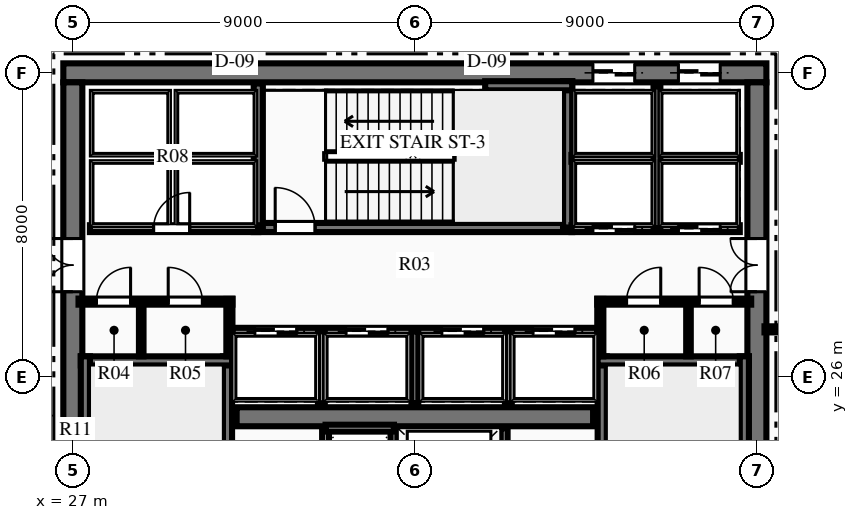
"""IFC4 building model, lengths in metres.
Left out: names, types, materials, properties, quantities, classifications, styles, units other than length and angle.
Written with IfcOpenShell. Run it as: python <this file> out.ifc"""

import sys

from ifc_helpers import new_model, si_unit, direction, frame, frame_2d, origin, place, context, subcontext, project, spatial, rectangle, extrude, element, fill, save


model = new_model("IFC4")
c1 = context("Model", 3, precision=1e-05, world=origin(), true_north=direction((0.0, 1.0)))
c2 = subcontext(c1, "Body", "Model", "MODEL_VIEW")
j1 = project(units=[si_unit("LENGTHUNIT", "METRE"), si_unit("PLANEANGLEUNIT", "RADIAN")], contexts=[c1])
p1 = place(None, origin())
s1 = spatial("IfcSite", under=j1, at=p1, CompositionType="ELEMENT")
p2 = place(p1, origin())
s2 = spatial("IfcBuilding", under=s1, at=p2, CompositionType="ELEMENT")
p3 = place(p2, frame((0.0, 0.0, 136.2)))
s3 = spatial("IfcBuildingStorey", under=s2, at=p3, CompositionType="ELEMENT", Elevation=136.2)
p4 = place(p3, frame((26.75, 34.0, 0.0), z_axis=(0.0, 0.0, 1.0), x_axis=(1.0, 0.0, 0.0)))
e1 = element("IfcWall", 1, at=p4, inside=s3, PredefinedType="SHEAR", context=c2, shape_type="SweptSolid", body=[
    extrude(rectangle(XDim=18.5, YDim=0.5, at=frame_2d((9.25, 0.0))), origin(), (0.0, 0.0, 1.0), 4.5),
])
p5 = place(p4, frame((13.935, 0.0, 0.0)))
e2 = element("IfcOpeningElement", 2, at=p5, cuts=e1, PredefinedType="OPENING", context=c2, shape_type="SweptSolid", body=[
    extrude(rectangle(XDim=1.1, YDim=2.15, at=frame_2d((0.55, 1.075))), frame((0.0, 0.26, 0.0), z_axis=(0.0, -1.0, 0.0), x_axis=(1.0, 0.0, 0.0)), (0.0, 0.0, 1.0), 0.52),
])
p6 = place(p4, frame((16.185, 0.0, 0.0)))
e3 = element("IfcOpeningElement", 3, at=p6, cuts=e1, PredefinedType="OPENING", context=c2, shape_type="SweptSolid", body=[
    extrude(rectangle(XDim=1.1, YDim=2.15, at=frame_2d((0.55, 1.075))), frame((0.0, 0.26, 0.0), z_axis=(0.0, -1.0, 0.0), x_axis=(1.0, 0.0, 0.0)), (0.0, 0.0, 1.0), 0.52),
])
p7 = place(p3, frame((27.0, 18.25, 0.0), z_axis=(0.0, 0.0, 1.0), x_axis=(0.0, 1.0, 0.0)))
e4 = element("IfcWall", 4, at=p7, inside=s3, PredefinedType="SHEAR", context=c2, shape_type="SweptSolid", body=[
    extrude(rectangle(XDim=15.5, YDim=0.5, at=frame_2d((7.75, 0.0))), origin(), (0.0, 0.0, 1.0), 4.5),
])
p8 = place(p7, frame((9.99, 0.0, 0.0)))
e5 = element("IfcOpeningElement", 5, at=p8, cuts=e4, PredefinedType="OPENING", context=c2, shape_type="SweptSolid", body=[
    extrude(rectangle(XDim=1.4, YDim=2.2, at=frame_2d((0.7, 1.1))), frame((0.0, 0.26, 0.0), z_axis=(0.0, -1.0, 0.0), x_axis=(1.0, 0.0, 0.0)), (0.0, 0.0, 1.0), 0.52),
])
p9 = place(p3, frame((45.0, 18.25, 0.0), z_axis=(0.0, 0.0, 1.0), x_axis=(0.0, 1.0, 0.0)))
e6 = element("IfcWall", 6, at=p9, inside=s3, PredefinedType="SHEAR", context=c2, shape_type="SweptSolid", body=[
    extrude(rectangle(XDim=15.5, YDim=0.5, at=frame_2d((7.75, 0.0))), origin(), (0.0, 0.0, 1.0), 4.5),
])
p10 = place(p9, frame((9.99, 0.0, 0.0)))
e7 = element("IfcOpeningElement", 7, at=p10, cuts=e6, PredefinedType="OPENING", context=c2, shape_type="SweptSolid", body=[
    extrude(rectangle(XDim=1.4, YDim=2.2, at=frame_2d((0.7, 1.1))), frame((0.0, 0.26, 0.0), z_axis=(0.0, -1.0, 0.0), x_axis=(1.0, 0.0, 0.0)), (0.0, 0.0, 1.0), 0.52),
])
p11 = place(p3, frame((31.31, 24.95, 0.0), z_axis=(0.0, 0.0, 1.0), x_axis=(1.0, 0.0, 0.0)))
e8 = element("IfcWall", 8, at=p11, inside=s3, PredefinedType="SHEAR", context=c2, shape_type="SweptSolid", body=[
    extrude(rectangle(XDim=9.38, YDim=0.5, at=frame_2d((4.69, 0.0))), origin(), (0.0, 0.0, 1.0), 4.5),
])
p12 = place(p3, frame((31.07, 18.28, 0.0), z_axis=(0.0, 0.0, 1.0), x_axis=(0.0, 1.0, 0.0)))
e9 = element("IfcWall", 9, at=p12, inside=s3, PredefinedType="SHEAR", context=c2, shape_type="SweptSolid", body=[
    extrude(rectangle(XDim=8.26, YDim=0.24, at=frame_2d((4.13, 0.0))), origin(), (0.0, 0.0, 1.0), 4.5),
])
p13 = place(p12, frame((0.365, 0.0, 0.0)))
e10 = element("IfcOpeningElement", 10, at=p13, cuts=e9, PredefinedType="OPENING", context=c2, shape_type="SweptSolid", body=[
    extrude(rectangle(XDim=1.05, YDim=2.15, at=frame_2d((0.525, 1.075))), frame((0.0, 0.13, 0.0), z_axis=(0.0, -1.0, 0.0), x_axis=(1.0, 0.0, 0.0)), (0.0, 0.0, 1.0), 0.26),
])
p14 = place(p3, frame((27.21, 26.42, 0.0), z_axis=(0.0, 0.0, 1.0), x_axis=(1.0, 0.0, 0.0)))
e11 = element("IfcWall", 11, at=p14, inside=s3, PredefinedType="SHEAR", context=c2, shape_type="SweptSolid", body=[
    extrude(rectangle(XDim=3.98, YDim=0.24, at=frame_2d((1.99, 0.0))), origin(), (0.0, 0.0, 1.0), 4.5),
])
p15 = place(p3, frame((27.33, 18.28, 0.0), z_axis=(0.0, 0.0, 1.0), x_axis=(0.0, 1.0, 0.0)))
e12 = element("IfcWall", 12, at=p15, inside=s3, PredefinedType="SHEAR", context=c2, shape_type="SweptSolid", body=[
    extrude(rectangle(XDim=8.26, YDim=0.24, at=frame_2d((4.13, 0.0))), origin(), (0.0, 0.0, 1.0), 4.5),
])
p16 = place(p3, frame((40.93, 18.28, 0.0), z_axis=(0.0, 0.0, 1.0), x_axis=(0.0, 1.0, 0.0)))
e13 = element("IfcWall", 13, at=p16, inside=s3, PredefinedType="SHEAR", context=c2, shape_type="SweptSolid", body=[
    extrude(rectangle(XDim=8.26, YDim=0.24, at=frame_2d((4.13, 0.0))), origin(), (0.0, 0.0, 1.0), 4.5),
])
p17 = place(p16, frame((0.365, 0.0, 0.0)))
e14 = element("IfcOpeningElement", 14, at=p17, cuts=e13, PredefinedType="OPENING", context=c2, shape_type="SweptSolid", body=[
    extrude(rectangle(XDim=1.05, YDim=2.15, at=frame_2d((0.525, 1.075))), frame((0.0, 0.13, 0.0), z_axis=(0.0, -1.0, 0.0), x_axis=(1.0, 0.0, 0.0)), (0.0, 0.0, 1.0), 0.26),
])
p18 = place(p3, frame((40.81, 26.42, 0.0), z_axis=(0.0, 0.0, 1.0), x_axis=(1.0, 0.0, 0.0)))
e15 = element("IfcWall", 15, at=p18, inside=s3, PredefinedType="SHEAR", context=c2, shape_type="SweptSolid", body=[
    extrude(rectangle(XDim=3.98, YDim=0.24, at=frame_2d((1.99, 0.0))), origin(), (0.0, 0.0, 1.0), 4.5),
])
p19 = place(p3, frame((44.67, 18.28, 0.0), z_axis=(0.0, 0.0, 1.0), x_axis=(0.0, 1.0, 0.0)))
e16 = element("IfcWall", 16, at=p19, inside=s3, PredefinedType="SHEAR", context=c2, shape_type="SweptSolid", body=[
    extrude(rectangle(XDim=8.26, YDim=0.24, at=frame_2d((4.13, 0.0))), origin(), (0.0, 0.0, 1.0), 4.5),
])
p20 = place(p3, frame((31.76, 29.93, 0.0), z_axis=(0.0, 0.0, 1.0), x_axis=(1.0, 0.0, 0.0)))
e17 = element("IfcWall", 17, at=p20, inside=s3, PredefinedType="SHEAR", context=c2, shape_type="SweptSolid", body=[
    extrude(rectangle(XDim=8.38, YDim=0.24, at=frame_2d((4.19, 0.0))), origin(), (0.0, 0.0, 1.0), 4.5),
])
p21 = place(p20, frame((0.565, 0.0, 0.0)))
e18 = element("IfcOpeningElement", 18, at=p21, cuts=e17, PredefinedType="OPENING", context=c2, shape_type="SweptSolid", body=[
    extrude(rectangle(XDim=1.05, YDim=2.15, at=frame_2d((0.525, 1.075))), frame((0.0, 0.13, 0.0), z_axis=(0.0, -1.0, 0.0), x_axis=(1.0, 0.0, 0.0)), (0.0, 0.0, 1.0), 0.26),
])
p22 = place(p3, frame((31.88, 29.93, 0.0), z_axis=(0.0, 0.0, 1.0), x_axis=(0.0, 1.0, 0.0)))
e19 = element("IfcWall", 19, at=p22, inside=s3, PredefinedType="SHEAR", context=c2, shape_type="SweptSolid", body=[
    extrude(rectangle(XDim=3.79, YDim=0.24, at=frame_2d((1.895, 0.0))), origin(), (0.0, 0.0, 1.0), 4.5),
])
p23 = place(p3, frame((40.02, 29.93, 0.0), z_axis=(0.0, 0.0, 1.0), x_axis=(0.0, 1.0, 0.0)))
e20 = element("IfcWall", 20, at=p23, inside=s3, PredefinedType="SHEAR", context=c2, shape_type="SweptSolid", body=[
    extrude(rectangle(XDim=3.85, YDim=0.24, at=frame_2d((1.925, 0.0))), origin(), (0.0, 0.0, 1.0), 4.5),
])
p24 = place(p3, frame((37.85, 33.66, 0.0), z_axis=(0.0, 0.0, 1.0), x_axis=(1.0, 0.0, 0.0)))
e21 = element("IfcWall", 21, at=p24, inside=s3, PredefinedType="SHEAR", context=c2, shape_type="SweptSolid", body=[
    extrude(rectangle(XDim=2.29, YDim=0.24, at=frame_2d((1.145, 0.0))), origin(), (0.0, 0.0, 1.0), 4.5),
])
for number, where, z_axis, x_axis in (
    (22, (33.65, 22.05, 0.0), (0.0, 0.0, 1.0), (0.0, 1.0, 0.0)),
    (23, (35.45, 22.05, 0.0), (0.0, 0.0, 1.0), (0.0, 1.0, 0.0)),
):
    element("IfcWall", number, at=place(p3, frame(where, z_axis=z_axis, x_axis=x_axis)), inside=s3, PredefinedType="PARTITIONING", context=c2, shape_type="SweptSolid", body=[
        extrude(rectangle(XDim=2.6, YDim=0.18, at=frame_2d((1.3, 0.0))), origin(), (0.0, 0.0, 1.0), 4.21),
    ])
p25 = place(p3, frame((33.65, 24.65, 0.0), z_axis=(0.0, 0.0, 1.0), x_axis=(1.0, 0.0, 0.0)))
e24 = element("IfcWall", 24, at=p25, inside=s3, PredefinedType="PARTITIONING", context=c2, shape_type="SweptSolid", body=[
    extrude(rectangle(XDim=1.8, YDim=0.18, at=frame_2d((0.9, 0.0))), origin(), (0.0, 0.0, 1.0), 4.21),
])
p26 = place(p3, frame((38.35, 22.05, 0.0), z_axis=(0.0, 0.0, 1.0), x_axis=(0.0, 1.0, 0.0)))
e25 = element("IfcWall", 25, at=p26, inside=s3, PredefinedType="PARTITIONING", context=c2, shape_type="SweptSolid", body=[
    extrude(rectangle(XDim=2.6, YDim=0.18, at=frame_2d((1.3, 0.0))), origin(), (0.0, 0.0, 1.0), 4.21),
])
p27 = place(p3, frame((27.15, 27.98, 0.0), z_axis=(0.0, 0.0, 1.0), x_axis=(1.0, 0.0, 0.0)))
e26 = element("IfcWall", 26, at=p27, inside=s3, PredefinedType="PARTITIONING", context=c2, shape_type="SweptSolid", body=[
    extrude(rectangle(XDim=4.05, YDim=0.16, at=frame_2d((2.025, 0.0))), origin(), (0.0, 0.0, 1.0), 4.21),
])
p28 = place(p27, frame((0.47, 0.0, 0.0)))
e27 = element("IfcOpeningElement", 27, at=p28, cuts=e26, PredefinedType="OPENING", context=c2, shape_type="SweptSolid", body=[
    extrude(rectangle(XDim=0.9, YDim=2.15, at=frame_2d((0.45, 1.075))), frame((0.0, 0.09, 0.0), z_axis=(0.0, -1.0, 0.0), x_axis=(1.0, 0.0, 0.0)), (0.0, 0.0, 1.0), 0.18),
])
p29 = place(p27, frame((2.36, 0.0, 0.0)))
e28 = element("IfcOpeningElement", 28, at=p29, cuts=e26, PredefinedType="OPENING", context=c2, shape_type="SweptSolid", body=[
    extrude(rectangle(XDim=0.9, YDim=2.15, at=frame_2d((0.45, 1.075))), frame((0.0, 0.09, 0.0), z_axis=(0.0, -1.0, 0.0), x_axis=(1.0, 0.0, 0.0)), (0.0, 0.0, 1.0), 0.18),
])
p30 = place(p3, frame((31.12, 26.54, 0.0), z_axis=(0.0, 0.0, 1.0), x_axis=(0.0, 1.0, 0.0)))
e29 = element("IfcWall", 29, at=p30, inside=s3, PredefinedType="PARTITIONING", context=c2, shape_type="SweptSolid", body=[
    extrude(rectangle(XDim=1.51, YDim=0.16, at=frame_2d((0.755, 0.0))), origin(), (0.0, 0.0, 1.0), 4.21),
])
p31 = place(p3, frame((40.8, 27.98, 0.0), z_axis=(0.0, 0.0, 1.0), x_axis=(1.0, 0.0, 0.0)))
e30 = element("IfcWall", 30, at=p31, inside=s3, PredefinedType="PARTITIONING", context=c2, shape_type="SweptSolid", body=[
    extrude(rectangle(XDim=4.05, YDim=0.16, at=frame_2d((2.025, 0.0))), origin(), (0.0, 0.0, 1.0), 4.21),
])
p32 = place(p31, frame((0.77, 0.0, 0.0)))
e31 = element("IfcOpeningElement", 31, at=p32, cuts=e30, PredefinedType="OPENING", context=c2, shape_type="SweptSolid", body=[
    extrude(rectangle(XDim=0.9, YDim=2.15, at=frame_2d((0.45, 1.075))), frame((0.0, 0.09, 0.0), z_axis=(0.0, -1.0, 0.0), x_axis=(1.0, 0.0, 0.0)), (0.0, 0.0, 1.0), 0.18),
])
p33 = place(p31, frame((2.68, 0.0, 0.0)))
e32 = element("IfcOpeningElement", 32, at=p33, cuts=e30, PredefinedType="OPENING", context=c2, shape_type="SweptSolid", body=[
    extrude(rectangle(XDim=0.9, YDim=2.15, at=frame_2d((0.45, 1.075))), frame((0.0, 0.09, 0.0), z_axis=(0.0, -1.0, 0.0), x_axis=(1.0, 0.0, 0.0)), (0.0, 0.0, 1.0), 0.18),
])
p34 = place(p3, frame((40.88, 26.54, 0.0), z_axis=(0.0, 0.0, 1.0), x_axis=(0.0, 1.0, 0.0)))
e33 = element("IfcWall", 33, at=p34, inside=s3, PredefinedType="PARTITIONING", context=c2, shape_type="SweptSolid", body=[
    extrude(rectangle(XDim=1.51, YDim=0.16, at=frame_2d((0.755, 0.0))), origin(), (0.0, 0.0, 1.0), 4.21),
])
for number, where, z_axis, x_axis in (
    (34, (28.8, 26.54, 0.0), (0.0, 0.0, 1.0), (0.0, 1.0, 0.0)),
    (35, (43.2, 26.54, 0.0), (0.0, 0.0, 1.0), (0.0, 1.0, 0.0)),
):
    element("IfcWall", number, at=place(p3, frame(where, z_axis=z_axis, x_axis=x_axis)), inside=s3, PredefinedType="PARTITIONING", context=c2, shape_type="SweptSolid", body=[
        extrude(rectangle(XDim=1.44, YDim=0.12, at=frame_2d((0.72, 0.0))), origin(), (0.0, 0.0, 1.0), 4.21),
    ])
p35 = place(p3, frame((27.45, 29.9, 0.0), z_axis=(0.0, 0.0, 1.0), x_axis=(1.0, 0.0, 0.0)))
e36 = element("IfcWall", 36, at=p35, inside=s3, PredefinedType="PARTITIONING", context=c2, shape_type="SweptSolid", body=[
    extrude(rectangle(XDim=4.43, YDim=0.18, at=frame_2d((2.215, 0.0))), origin(), (0.0, 0.0, 1.0), 4.21),
])
p36 = place(p35, frame((1.675, 0.0, 0.0)))
e37 = element("IfcOpeningElement", 37, at=p36, cuts=e36, PredefinedType="OPENING", context=c2, shape_type="SweptSolid", body=[
    extrude(rectangle(XDim=0.95, YDim=2.15, at=frame_2d((0.475, 1.075))), frame((0.0, 0.1, 0.0), z_axis=(0.0, -1.0, 0.0), x_axis=(1.0, 0.0, 0.0)), (0.0, 0.0, 1.0), 0.2),
])
p37 = place(p3, frame((40.12, 29.9, 0.0), z_axis=(0.0, 0.0, 1.0), x_axis=(1.0, 0.0, 0.0)))
e38 = element("IfcWall", 38, at=p37, inside=s3, PredefinedType="PARTITIONING", context=c2, shape_type="SweptSolid", body=[
    extrude(rectangle(XDim=4.43, YDim=0.18, at=frame_2d((2.215, 0.0))), origin(), (0.0, 0.0, 1.0), 4.21),
])
p38 = place(p37, frame((0.565, 0.0, 0.0)))
e39 = element("IfcOpeningElement", 39, at=p38, cuts=e38, PredefinedType="OPENING", context=c2, shape_type="SweptSolid", body=[
    extrude(rectangle(XDim=1.1, YDim=2.15, at=frame_2d((0.55, 1.075))), frame((0.0, 0.1, 0.0), z_axis=(0.0, -1.0, 0.0), x_axis=(1.0, 0.0, 0.0)), (0.0, 0.0, 1.0), 0.2),
])
p39 = place(p37, frame((2.815, 0.0, 0.0)))
e40 = element("IfcOpeningElement", 40, at=p39, cuts=e38, PredefinedType="OPENING", context=c2, shape_type="SweptSolid", body=[
    extrude(rectangle(XDim=1.1, YDim=2.15, at=frame_2d((0.55, 1.075))), frame((0.0, 0.1, 0.0), z_axis=(0.0, -1.0, 0.0), x_axis=(1.0, 0.0, 0.0)), (0.0, 0.0, 1.0), 0.2),
])
p40 = place(p3, frame((40.12, 31.75, 0.0), z_axis=(0.0, 0.0, 1.0), x_axis=(1.0, 0.0, 0.0)))
e41 = element("IfcWall", 41, at=p40, inside=s3, PredefinedType="PARTITIONING", context=c2, shape_type="SweptSolid", body=[
    extrude(rectangle(XDim=4.43, YDim=0.18, at=frame_2d((2.215, 0.0))), origin(), (0.0, 0.0, 1.0), 4.21),
])
p41 = place(p3, frame((42.37, 29.9, 0.0), z_axis=(0.0, 0.0, 1.0), x_axis=(0.0, 1.0, 0.0)))
e42 = element("IfcWall", 42, at=p41, inside=s3, PredefinedType="PARTITIONING", context=c2, shape_type="SweptSolid", body=[
    extrude(rectangle(XDim=3.75, YDim=0.18, at=frame_2d((1.875, 0.0))), origin(), (0.0, 0.0, 1.0), 4.21),
])
p42 = place(p3, frame((31.2, 27.2, 0.0), z_axis=(0.0, 0.0, 1.0), x_axis=(1.0, 0.0, 0.0)))
e43 = element("IfcWall", 43, at=p42, inside=s3, PredefinedType="PARTITIONING", context=c2, shape_type="SweptSolid", body=[
    extrude(rectangle(XDim=9.6, YDim=0.18, at=frame_2d((4.8, 0.0))), origin(), (0.0, 0.0, 1.0), 4.21),
])
p43 = place(p42, frame((0.59, 0.0, 0.0)))
e44 = element("IfcOpeningElement", 44, at=p43, cuts=e43, PredefinedType="OPENING", context=c2, shape_type="SweptSolid", body=[
    extrude(rectangle(XDim=1.1, YDim=2.15, at=frame_2d((0.55, 1.075))), frame((0.0, 0.1, 0.0), z_axis=(0.0, -1.0, 0.0), x_axis=(1.0, 0.0, 0.0)), (0.0, 0.0, 1.0), 0.2),
])
p44 = place(p42, frame((2.99, 0.0, 0.0)))
e45 = element("IfcOpeningElement", 45, at=p44, cuts=e43, PredefinedType="OPENING", context=c2, shape_type="SweptSolid", body=[
    extrude(rectangle(XDim=1.1, YDim=2.15, at=frame_2d((0.55, 1.075))), frame((0.0, 0.1, 0.0), z_axis=(0.0, -1.0, 0.0), x_axis=(1.0, 0.0, 0.0)), (0.0, 0.0, 1.0), 0.2),
])
p45 = place(p42, frame((5.51, 0.0, 0.0)))
e46 = element("IfcOpeningElement", 46, at=p45, cuts=e43, PredefinedType="OPENING", context=c2, shape_type="SweptSolid", body=[
    extrude(rectangle(XDim=1.1, YDim=2.15, at=frame_2d((0.55, 1.075))), frame((0.0, 0.1, 0.0), z_axis=(0.0, -1.0, 0.0), x_axis=(1.0, 0.0, 0.0)), (0.0, 0.0, 1.0), 0.2),
])
p46 = place(p42, frame((7.91, 0.0, 0.0)))
e47 = element("IfcOpeningElement", 47, at=p46, cuts=e43, PredefinedType="OPENING", context=c2, shape_type="SweptSolid", body=[
    extrude(rectangle(XDim=1.1, YDim=2.15, at=frame_2d((0.55, 1.075))), frame((0.0, 0.1, 0.0), z_axis=(0.0, -1.0, 0.0), x_axis=(1.0, 0.0, 0.0)), (0.0, 0.0, 1.0), 0.2),
])
for number, where, z_axis, x_axis in (
    (48, (33.54, 25.3, 0.0), (0.0, 0.0, 1.0), (0.0, 1.0, 0.0)),
    (49, (36.0, 25.3, 0.0), (0.0, 0.0, 1.0), (0.0, 1.0, 0.0)),
    (50, (38.46, 25.3, 0.0), (0.0, 0.0, 1.0), (0.0, 1.0, 0.0)),
):
    element("IfcWall", number, at=place(p3, frame(where, z_axis=z_axis, x_axis=x_axis)), inside=s3, PredefinedType="PARTITIONING", context=c2, shape_type="SweptSolid", body=[
        extrude(rectangle(XDim=1.9, YDim=0.18, at=frame_2d((0.95, 0.0))), origin(), (0.0, 0.0, 1.0), 4.21),
    ])
p47 = place(p3, frame((45.2, 27.25, 0.0), z_axis=(0.0, 0.0, 1.0), x_axis=(1.0, 0.0, 0.0)))
e51 = element("IfcWall", 51, at=p47, inside=s3, PredefinedType="PARTITIONING", context=c2, shape_type="SweptSolid", body=[
    extrude(rectangle(XDim=2.25, YDim=0.16, at=frame_2d((1.125, 0.0))), origin(), (0.0, 0.0, 1.0), 4.21),
])
p48 = place(p28, origin())
e52 = element("IfcDoor", 52, at=p48, inside=s3, OperationType="SINGLE_SWING_RIGHT", PredefinedType="DOOR", context=c2, shape_type="SweptSolid", body=[
    extrude(rectangle(XDim=0.9, YDim=2.15, at=frame_2d((0.45, 1.075))), frame((0.0, 0.025, 0.0), z_axis=(0.0, -1.0, 0.0), x_axis=(1.0, 0.0, 0.0)), (0.0, 0.0, 1.0), 0.05),
])
fill(e27, e52)
p49 = place(p29, origin())
e53 = element("IfcDoor", 53, at=p49, inside=s3, OperationType="SINGLE_SWING_LEFT", PredefinedType="DOOR", context=c2, shape_type="SweptSolid", body=[
    extrude(rectangle(XDim=0.9, YDim=2.15, at=frame_2d((0.45, 1.075))), frame((0.0, 0.025, 0.0), z_axis=(0.0, -1.0, 0.0), x_axis=(1.0, 0.0, 0.0)), (0.0, 0.0, 1.0), 0.05),
])
fill(e28, e53)
p50 = place(p32, origin())
e54 = element("IfcDoor", 54, at=p50, inside=s3, OperationType="SINGLE_SWING_RIGHT", PredefinedType="DOOR", context=c2, shape_type="SweptSolid", body=[
    extrude(rectangle(XDim=0.9, YDim=2.15, at=frame_2d((0.45, 1.075))), frame((0.0, 0.025, 0.0), z_axis=(0.0, -1.0, 0.0), x_axis=(1.0, 0.0, 0.0)), (0.0, 0.0, 1.0), 0.05),
])
fill(e31, e54)
p51 = place(p33, origin())
e55 = element("IfcDoor", 55, at=p51, inside=s3, OperationType="SINGLE_SWING_LEFT", PredefinedType="DOOR", context=c2, shape_type="SweptSolid", body=[
    extrude(rectangle(XDim=0.9, YDim=2.15, at=frame_2d((0.45, 1.075))), frame((0.0, 0.025, 0.0), z_axis=(0.0, -1.0, 0.0), x_axis=(1.0, 0.0, 0.0)), (0.0, 0.0, 1.0), 0.05),
])
fill(e32, e55)
p52 = place(p36, origin())
e56 = element("IfcDoor", 56, at=p52, inside=s3, OperationType="SINGLE_SWING_RIGHT", PredefinedType="DOOR", context=c2, shape_type="SweptSolid", body=[
    extrude(rectangle(XDim=0.95, YDim=2.15, at=frame_2d((0.475, 1.075))), frame((0.0, 0.025, 0.0), z_axis=(0.0, -1.0, 0.0), x_axis=(1.0, 0.0, 0.0)), (0.0, 0.0, 1.0), 0.05),
])
fill(e37, e56)
p53 = place(p21, origin())
e57 = element("IfcDoor", 57, at=p53, inside=s3, OperationType="SINGLE_SWING_LEFT", PredefinedType="DOOR", context=c2, shape_type="SweptSolid", body=[
    extrude(rectangle(XDim=1.05, YDim=2.15, at=frame_2d((0.525, 1.075))), frame((0.0, 0.025, 0.0), z_axis=(0.0, -1.0, 0.0), x_axis=(1.0, 0.0, 0.0)), (0.0, 0.0, 1.0), 0.05),
])
fill(e18, e57)
p54 = place(p8, origin())
e58 = element("IfcDoor", 58, at=p54, inside=s3, OperationType="DOUBLE_DOOR_SINGLE_SWING", PredefinedType="DOOR", context=c2, shape_type="SweptSolid", body=[
    extrude(rectangle(XDim=1.4, YDim=2.2, at=frame_2d((0.7, 1.1))), frame((0.0, 0.025, 0.0), z_axis=(0.0, -1.0, 0.0), x_axis=(1.0, 0.0, 0.0)), (0.0, 0.0, 1.0), 0.05),
])
fill(e5, e58)
p55 = place(p10, origin())
e59 = element("IfcDoor", 59, at=p55, inside=s3, OperationType="DOUBLE_DOOR_SINGLE_SWING", PredefinedType="DOOR", context=c2, shape_type="SweptSolid", body=[
    extrude(rectangle(XDim=1.4, YDim=2.2, at=frame_2d((0.7, 1.1))), frame((0.0, 0.025, 0.0), z_axis=(0.0, -1.0, 0.0), x_axis=(1.0, 0.0, 0.0)), (0.0, 0.0, 1.0), 0.05),
])
fill(e7, e59)
p56 = place(p38, origin())
e60 = element("IfcDoor", 60, at=p56, inside=s3, OperationType="SLIDING_TO_LEFT", PredefinedType="DOOR", context=c2, shape_type="SweptSolid", body=[
    extrude(rectangle(XDim=1.1, YDim=2.15, at=frame_2d((0.55, 1.075))), frame((0.0, 0.025, 0.0), z_axis=(0.0, -1.0, 0.0), x_axis=(1.0, 0.0, 0.0)), (0.0, 0.0, 1.0), 0.05),
])
fill(e39, e60)
p57 = place(p39, origin())
e61 = element("IfcDoor", 61, at=p57, inside=s3, OperationType="SLIDING_TO_LEFT", PredefinedType="DOOR", context=c2, shape_type="SweptSolid", body=[
    extrude(rectangle(XDim=1.1, YDim=2.15, at=frame_2d((0.55, 1.075))), frame((0.0, 0.025, 0.0), z_axis=(0.0, -1.0, 0.0), x_axis=(1.0, 0.0, 0.0)), (0.0, 0.0, 1.0), 0.05),
])
fill(e40, e61)
p58 = place(p5, origin())
e62 = element("IfcDoor", 62, at=p58, inside=s3, OperationType="SLIDING_TO_LEFT", PredefinedType="DOOR", context=c2, shape_type="SweptSolid", body=[
    extrude(rectangle(XDim=1.1, YDim=2.15, at=frame_2d((0.55, 1.075))), frame((0.0, 0.025, 0.0), z_axis=(0.0, -1.0, 0.0), x_axis=(1.0, 0.0, 0.0)), (0.0, 0.0, 1.0), 0.05),
])
fill(e2, e62)
p59 = place(p6, origin())
e63 = element("IfcDoor", 63, at=p59, inside=s3, OperationType="SLIDING_TO_LEFT", PredefinedType="DOOR", context=c2, shape_type="SweptSolid", body=[
    extrude(rectangle(XDim=1.1, YDim=2.15, at=frame_2d((0.55, 1.075))), frame((0.0, 0.025, 0.0), z_axis=(0.0, -1.0, 0.0), x_axis=(1.0, 0.0, 0.0)), (0.0, 0.0, 1.0), 0.05),
])
fill(e3, e63)
p60 = place(p43, origin())
e64 = element("IfcDoor", 64, at=p60, inside=s3, OperationType="SLIDING_TO_LEFT", PredefinedType="DOOR", context=c2, shape_type="SweptSolid", body=[
    extrude(rectangle(XDim=1.1, YDim=2.15, at=frame_2d((0.55, 1.075))), frame((0.0, 0.025, 0.0), z_axis=(0.0, -1.0, 0.0), x_axis=(1.0, 0.0, 0.0)), (0.0, 0.0, 1.0), 0.05),
])
fill(e44, e64)
p61 = place(p44, origin())
e65 = element("IfcDoor", 65, at=p61, inside=s3, OperationType="SLIDING_TO_LEFT", PredefinedType="DOOR", context=c2, shape_type="SweptSolid", body=[
    extrude(rectangle(XDim=1.1, YDim=2.15, at=frame_2d((0.55, 1.075))), frame((0.0, 0.025, 0.0), z_axis=(0.0, -1.0, 0.0), x_axis=(1.0, 0.0, 0.0)), (0.0, 0.0, 1.0), 0.05),
])
fill(e45, e65)
p62 = place(p45, origin())
e66 = element("IfcDoor", 66, at=p62, inside=s3, OperationType="SLIDING_TO_LEFT", PredefinedType="DOOR", context=c2, shape_type="SweptSolid", body=[
    extrude(rectangle(XDim=1.1, YDim=2.15, at=frame_2d((0.55, 1.075))), frame((0.0, 0.025, 0.0), z_axis=(0.0, -1.0, 0.0), x_axis=(1.0, 0.0, 0.0)), (0.0, 0.0, 1.0), 0.05),
])
fill(e46, e66)
p63 = place(p46, origin())
e67 = element("IfcDoor", 67, at=p63, inside=s3, OperationType="SLIDING_TO_LEFT", PredefinedType="DOOR", context=c2, shape_type="SweptSolid", body=[
    extrude(rectangle(XDim=1.1, YDim=2.15, at=frame_2d((0.55, 1.075))), frame((0.0, 0.025, 0.0), z_axis=(0.0, -1.0, 0.0), x_axis=(1.0, 0.0, 0.0)), (0.0, 0.0, 1.0), 0.05),
])
fill(e47, e67)
save(model, sys.argv[1])
